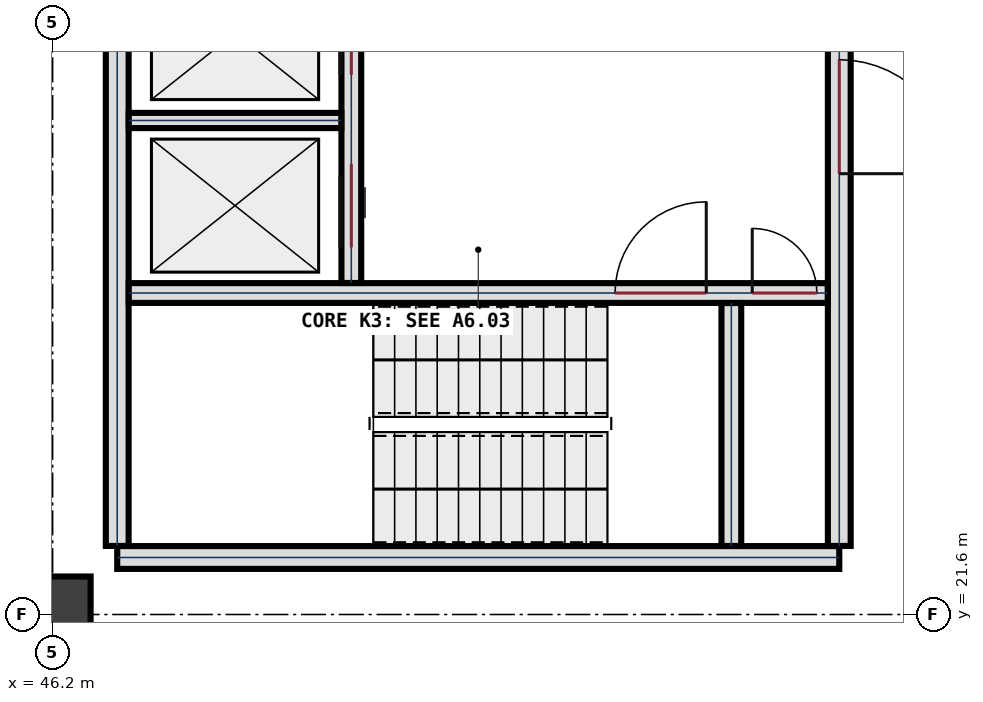
"""IFC4 building model, lengths in metres.
Left out: names, types, materials, properties, quantities, classifications, styles, units other than length and angle.
Written with IfcOpenShell. Run it as: python <this file> out.ifc"""

import sys

from ifc_helpers import new_model, si_unit, direction, frame, frame_2d, origin, origin_2d, place, context, subcontext, project, spatial, rectangle, extrude, element, fill, save


model = new_model("IFC4")
c1 = context("Model", 3, precision=1e-05, world=origin(), true_north=direction((0.0, 1.0)))
c2 = subcontext(c1, "Body", "Model", "MODEL_VIEW")
j1 = project(units=[si_unit("LENGTHUNIT", "METRE"), si_unit("PLANEANGLEUNIT", "RADIAN")], contexts=[c1])
p1 = place(None, origin())
s1 = spatial("IfcSite", under=j1, at=p1, CompositionType="ELEMENT")
p2 = place(p1, origin())
s2 = spatial("IfcBuilding", under=s1, at=p2, CompositionType="ELEMENT")
p3 = place(p2, frame((0.0, 0.0, -8.4)))
s3 = spatial("IfcBuildingStorey", under=s2, at=p3, CompositionType="ELEMENT", Elevation=-8.4)
p4 = place(p3, frame((46.2, 21.6, 0.0), z_axis=(0.0, 0.0, 1.0), x_axis=(1.0, 0.0, 0.0)))
e1 = element("IfcColumn", 1, at=p4, inside=s3, PredefinedType="COLUMN", context=c2, shape_type="SweptSolid", body=[
    extrude(rectangle(XDim=1.0, YDim=1.0, at=origin_2d()), origin(), (0.0, 0.0, 1.0), 4.2),
])
p5 = place(p3, frame((56.55, 22.35, 0.0), z_axis=(0.0, 0.0, 1.0), x_axis=(-1.0, 0.0, 0.0)))
e2 = element("IfcWall", 2, at=p5, inside=s3, PredefinedType="SHEAR", context=c2, shape_type="SweptSolid", body=[
    extrude(rectangle(XDim=9.5, YDim=0.3, at=frame_2d((4.75, 0.0))), origin(), (0.0, 0.0, 1.0), 4.2),
])
p6 = place(p3, frame((47.05, 22.502, 0.0), z_axis=(0.0, 0.0, 1.0), x_axis=(0.0, 1.0, 0.0)))
e3 = element("IfcWall", 3, at=p6, inside=s3, PredefinedType="SHEAR", context=c2, shape_type="SweptSolid", body=[
    extrude(rectangle(XDim=7.796, YDim=0.3, at=frame_2d((3.898, 0.0))), origin(), (0.0, 0.0, 1.0), 4.2),
])
p7 = place(p3, frame((56.55, 30.298, 0.0), z_axis=(0.0, 0.0, 1.0), x_axis=(0.0, -1.0, 0.0)))
e4 = element("IfcWall", 4, at=p7, inside=s3, PredefinedType="SHEAR", context=c2, shape_type="SweptSolid", body=[
    extrude(rectangle(XDim=7.796, YDim=0.3, at=frame_2d((3.898, 0.0))), origin(), (0.0, 0.0, 1.0), 4.2),
])
p8 = place(p7, frame((1.398, 0.0, 0.0)))
e5 = element("IfcOpeningElement", 5, at=p8, cuts=e4, PredefinedType="OPENING", context=c2, shape_type="SweptSolid", body=[
    extrude(rectangle(XDim=1.5, YDim=2.25, at=frame_2d((0.75, 1.125))), frame((0.0, 0.16, 0.0), z_axis=(0.0, -1.0, 0.0), x_axis=(1.0, 0.0, 0.0)), (0.0, 0.0, 1.0), 0.32),
])
p9 = place(p3, frame((47.202, 25.83, 0.0), z_axis=(0.0, 0.0, 1.0), x_axis=(1.0, 0.0, 0.0)))
e6 = element("IfcWall", 6, at=p9, inside=s3, PredefinedType="SHEAR", context=c2, shape_type="SweptSolid", body=[
    extrude(rectangle(XDim=9.196, YDim=0.26, at=frame_2d((4.598, 0.0))), origin(), (0.0, 0.0, 1.0), 4.2),
])
p10 = place(p9, frame((6.398, 0.0, 0.0)))
e7 = element("IfcOpeningElement", 7, at=p10, cuts=e6, PredefinedType="OPENING", context=c2, shape_type="SweptSolid", body=[
    extrude(rectangle(XDim=1.2, YDim=2.2, at=frame_2d((0.6, 1.1))), frame((0.0, 0.14, 0.0), z_axis=(0.0, -1.0, 0.0), x_axis=(1.0, 0.0, 0.0)), (0.0, 0.0, 1.0), 0.28),
])
p11 = place(p9, frame((8.203, 0.0, 0.0)))
e8 = element("IfcOpeningElement", 8, at=p11, cuts=e6, PredefinedType="OPENING", context=c2, shape_type="SweptSolid", body=[
    extrude(rectangle(XDim=0.85, YDim=2.05, at=frame_2d((0.425, 1.025))), frame((0.0, 0.14, 0.0), z_axis=(0.0, -1.0, 0.0), x_axis=(1.0, 0.0, 0.0)), (0.0, 0.0, 1.0), 0.28),
])
p12 = place(p3, frame((55.13, 22.502, 0.0), z_axis=(0.0, 0.0, 1.0), x_axis=(0.0, 1.0, 0.0)))
e9 = element("IfcWall", 9, at=p12, inside=s3, PredefinedType="SHEAR", context=c2, shape_type="SweptSolid", body=[
    extrude(rectangle(XDim=3.196, YDim=0.26, at=frame_2d((1.598, 0.0))), origin(), (0.0, 0.0, 1.0), 4.2),
])
p13 = place(p3, frame((50.13, 25.962, 0.0), z_axis=(0.0, 0.0, 1.0), x_axis=(0.0, 1.0, 0.0)))
e10 = element("IfcWall", 10, at=p13, inside=s3, PredefinedType="SHEAR", context=c2, shape_type="SweptSolid", body=[
    extrude(rectangle(XDim=4.336, YDim=0.26, at=frame_2d((2.168, 0.0))), origin(), (0.0, 0.0, 1.0), 4.2),
])
p14 = place(p13, frame((0.468, 0.0, 0.0)))
e11 = element("IfcOpeningElement", 11, at=p14, cuts=e10, PredefinedType="OPENING", context=c2, shape_type="SweptSolid", body=[
    extrude(rectangle(XDim=1.1, YDim=2.15, at=frame_2d((0.55, 1.075))), frame((0.0, 0.14, 0.0), z_axis=(0.0, -1.0, 0.0), x_axis=(1.0, 0.0, 0.0)), (0.0, 0.0, 1.0), 0.28),
])
p15 = place(p13, frame((2.738, 0.0, 0.0)))
e12 = element("IfcOpeningElement", 12, at=p15, cuts=e10, PredefinedType="OPENING", context=c2, shape_type="SweptSolid", body=[
    extrude(rectangle(XDim=1.1, YDim=2.15, at=frame_2d((0.55, 1.075))), frame((0.0, 0.14, 0.0), z_axis=(0.0, -1.0, 0.0), x_axis=(1.0, 0.0, 0.0)), (0.0, 0.0, 1.0), 0.28),
])
p16 = place(p3, frame((47.202, 28.1, 0.0), z_axis=(0.0, 0.0, 1.0), x_axis=(1.0, 0.0, 0.0)))
e13 = element("IfcWall", 13, at=p16, inside=s3, PredefinedType="PLUMBINGWALL", context=c2, shape_type="SweptSolid", body=[
    extrude(rectangle(XDim=2.796, YDim=0.2, at=frame_2d((1.398, 0.0))), origin(), (0.0, 0.0, 1.0), 3.86),
])
p17 = place(p8, origin())
e14 = element("IfcDoor", 14, at=p17, inside=s3, OperationType="SINGLE_SWING_RIGHT", PredefinedType="DOOR", context=c2, shape_type="SweptSolid", body=[
    extrude(rectangle(XDim=1.5, YDim=2.25, at=frame_2d((0.75, 1.125))), frame((0.0, 0.032, 0.0), z_axis=(0.0, -1.0, 0.0), x_axis=(1.0, 0.0, 0.0)), (0.0, 0.0, 1.0), 0.065),
])
fill(e5, e14)
p18 = place(p10, origin())
e15 = element("IfcDoor", 15, at=p18, inside=s3, OperationType="SINGLE_SWING_RIGHT", PredefinedType="DOOR", context=c2, shape_type="SweptSolid", body=[
    extrude(rectangle(XDim=1.2, YDim=2.2, at=frame_2d((0.6, 1.1))), frame((0.0, 0.032, 0.0), z_axis=(0.0, -1.0, 0.0), x_axis=(1.0, 0.0, 0.0)), (0.0, 0.0, 1.0), 0.065),
])
fill(e7, e15)
p19 = place(p11, origin())
e16 = element("IfcDoor", 16, at=p19, inside=s3, OperationType="SINGLE_SWING_LEFT", PredefinedType="DOOR", context=c2, shape_type="SweptSolid", body=[
    extrude(rectangle(XDim=0.85, YDim=2.05, at=frame_2d((0.425, 1.025))), frame((0.0, 0.032, 0.0), z_axis=(0.0, -1.0, 0.0), x_axis=(1.0, 0.0, 0.0)), (0.0, 0.0, 1.0), 0.065),
])
fill(e8, e16)
p20 = place(p14, origin())
e17 = element("IfcDoor", 17, at=p20, inside=s3, OperationType="SLIDING_TO_LEFT", PredefinedType="DOOR", context=c2, shape_type="SweptSolid", body=[
    extrude(rectangle(XDim=1.1, YDim=2.15, at=frame_2d((0.55, 1.075))), frame((0.0, 0.032, 0.0), z_axis=(0.0, -1.0, 0.0), x_axis=(1.0, 0.0, 0.0)), (0.0, 0.0, 1.0), 0.065),
])
fill(e11, e17)
p21 = place(p15, origin())
e18 = element("IfcDoor", 18, at=p21, inside=s3, OperationType="SLIDING_TO_LEFT", PredefinedType="DOOR", context=c2, shape_type="SweptSolid", body=[
    extrude(rectangle(XDim=1.1, YDim=2.15, at=frame_2d((0.55, 1.075))), frame((0.0, 0.032, 0.0), z_axis=(0.0, -1.0, 0.0), x_axis=(1.0, 0.0, 0.0)), (0.0, 0.0, 1.0), 0.065),
])
fill(e12, e18)
save(model, sys.argv[1])
